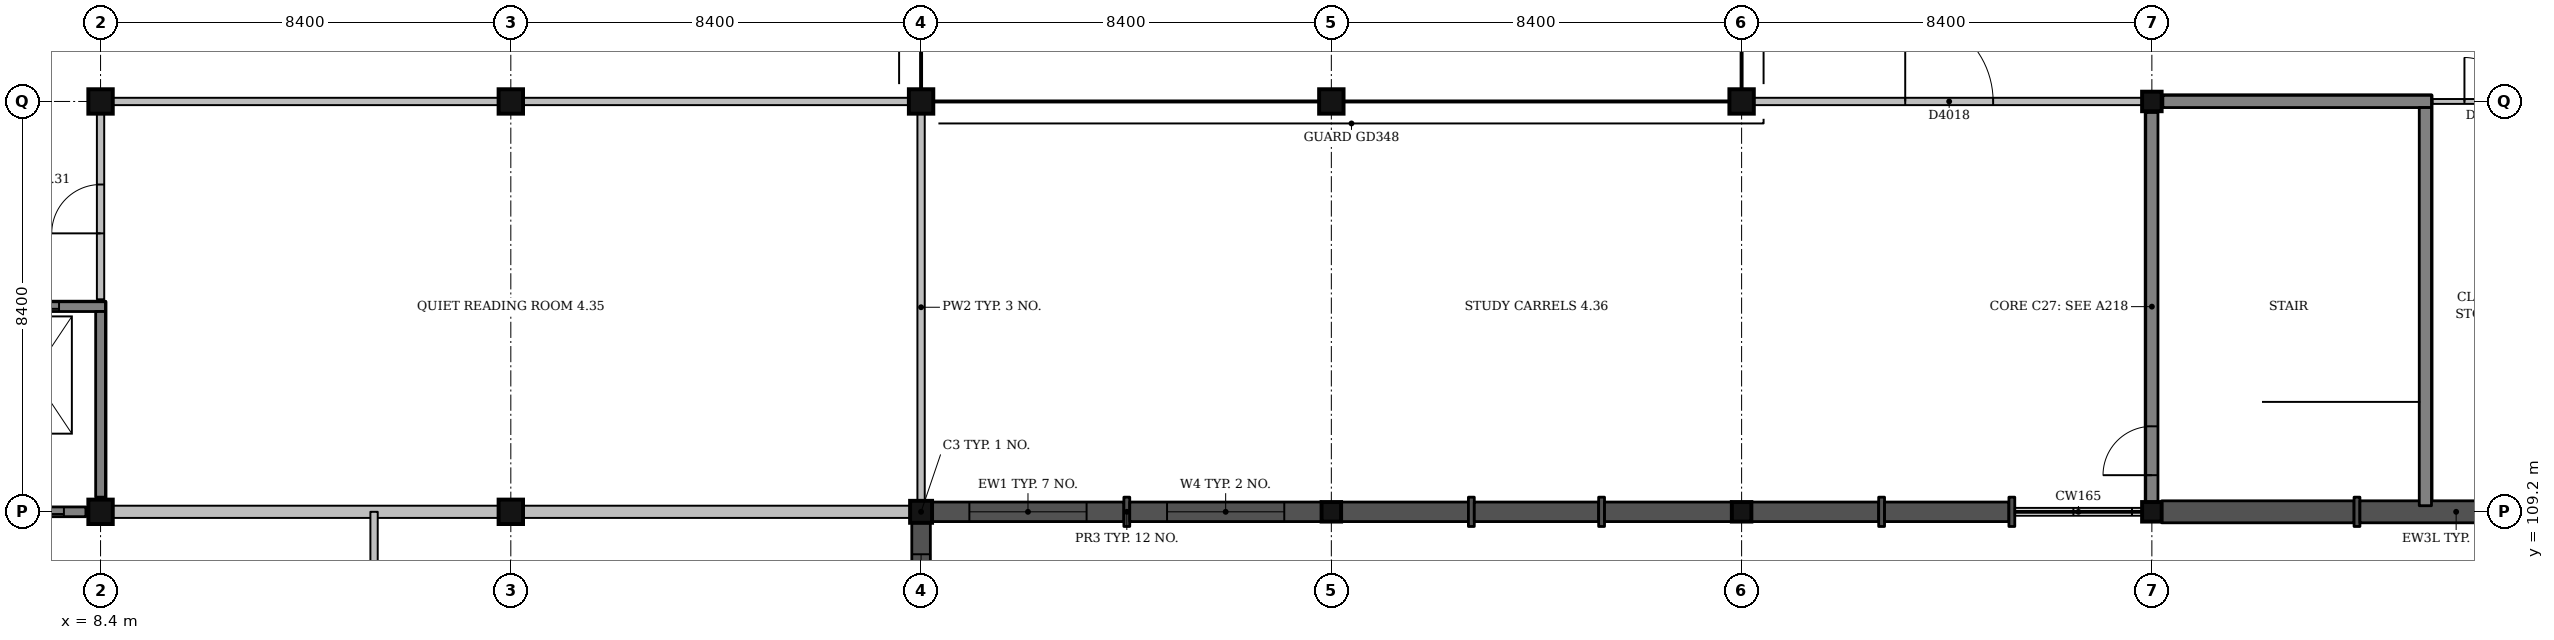
"""IFC4 building model, lengths in metres.
Left out: names, types, materials, properties, quantities, classifications, styles, units other than length and angle.
Written with IfcOpenShell. Run it as: python <this file> out.ifc"""

import sys

from ifc_helpers import new_model, si_unit, direction, frame, frame_2d, origin, origin_2d, place, context, subcontext, project, spatial, rectangle, extrude, element, fill, save


model = new_model("IFC4")
c1 = context("Model", 3, precision=1e-05, world=origin(), true_north=direction((0.0, 1.0)))
c2 = subcontext(c1, "Body", "Model", "MODEL_VIEW")
j1 = project(units=[si_unit("LENGTHUNIT", "METRE"), si_unit("PLANEANGLEUNIT", "RADIAN")], contexts=[c1])
p1 = place(None, origin())
s1 = spatial("IfcSite", under=j1, at=p1, CompositionType="ELEMENT")
p2 = place(p1, origin())
s2 = spatial("IfcBuilding", under=s1, at=p2, CompositionType="ELEMENT")
p3 = place(p2, frame((0.0, 0.0, 18.0)))
s3 = spatial("IfcBuildingStorey", under=s2, at=p3, CompositionType="ELEMENT", Elevation=18.0)
for number, where, z_axis, x_axis in (
    (1, (8.4, 109.2, 0.0), (0.0, 0.0, 1.0), (1.0, 0.0, 0.0)),
    (2, (16.8, 109.2, 0.0), (0.0, 0.0, 1.0), (1.0, 0.0, 0.0)),
):
    element("IfcColumn", number, at=place(p3, frame(where, z_axis=z_axis, x_axis=x_axis)), inside=s3, PredefinedType="COLUMN", context=c2, shape_type="SweptSolid", body=[
        extrude(rectangle(XDim=0.5, YDim=0.5, at=origin_2d()), origin(), (0.0, 0.0, 1.0), 4.5),
    ])
p4 = place(p3, frame((25.2, 109.2, 0.0), z_axis=(0.0, 0.0, 1.0), x_axis=(1.0, 0.0, 0.0)))
e3 = element("IfcColumn", 3, at=p4, inside=s3, PredefinedType="COLUMN", context=c2, shape_type="SweptSolid", body=[
    extrude(rectangle(XDim=0.45, YDim=0.45, at=origin_2d()), origin(), (0.0, 0.0, 1.0), 4.5),
])
for number, where, z_axis, x_axis in (
    (4, (8.4, 117.6, 0.0), (0.0, 0.0, 1.0), (1.0, 0.0, 0.0)),
    (5, (16.8, 117.6, 0.0), (0.0, 0.0, 1.0), (1.0, 0.0, 0.0)),
    (6, (25.2, 117.6, 0.0), (0.0, 0.0, 1.0), (1.0, 0.0, 0.0)),
):
    element("IfcColumn", number, at=place(p3, frame(where, z_axis=z_axis, x_axis=x_axis)), inside=s3, PredefinedType="COLUMN", context=c2, shape_type="SweptSolid", body=[
        extrude(rectangle(XDim=0.5, YDim=0.5, at=origin_2d()), origin(), (0.0, 0.0, 1.0), 4.5),
    ])
p5 = place(p3, frame((33.6, 109.2, 0.0), z_axis=(0.0, 0.0, 1.0), x_axis=(1.0, 0.0, 0.0)))
e7 = element("IfcColumn", 7, at=p5, inside=s3, PredefinedType="COLUMN", context=c2, shape_type="SweptSolid", body=[
    extrude(rectangle(XDim=0.4, YDim=0.4, at=origin_2d()), origin(), (0.0, 0.0, 1.0), 4.5),
])
p6 = place(p3, frame((33.6, 117.6, 0.0), z_axis=(0.0, 0.0, 1.0), x_axis=(1.0, 0.0, 0.0)))
e8 = element("IfcColumn", 8, at=p6, inside=s3, PredefinedType="COLUMN", context=c2, shape_type="SweptSolid", body=[
    extrude(rectangle(XDim=0.5, YDim=0.5, at=origin_2d()), origin(), (0.0, 0.0, 1.0), 4.5),
])
p7 = place(p3, frame((42.0, 109.2, 0.0), z_axis=(0.0, 0.0, 1.0), x_axis=(1.0, 0.0, 0.0)))
e9 = element("IfcColumn", 9, at=p7, inside=s3, PredefinedType="COLUMN", context=c2, shape_type="SweptSolid", body=[
    extrude(rectangle(XDim=0.4, YDim=0.4, at=origin_2d()), origin(), (0.0, 0.0, 1.0), 4.5),
])
p8 = place(p3, frame((42.0, 117.6, 0.0), z_axis=(0.0, 0.0, 1.0), x_axis=(1.0, 0.0, 0.0)))
e10 = element("IfcColumn", 10, at=p8, inside=s3, PredefinedType="COLUMN", context=c2, shape_type="SweptSolid", body=[
    extrude(rectangle(XDim=0.5, YDim=0.5, at=origin_2d()), origin(), (0.0, 0.0, 1.0), 4.5),
])
for number, where, z_axis, x_axis in (
    (11, (50.4, 109.2, 0.0), (0.0, 0.0, 1.0), (1.0, 0.0, 0.0)),
    (12, (50.4, 117.6, 0.0), (0.0, 0.0, 1.0), (1.0, 0.0, 0.0)),
):
    element("IfcColumn", number, at=place(p3, frame(where, z_axis=z_axis, x_axis=x_axis)), inside=s3, PredefinedType="COLUMN", context=c2, shape_type="SweptSolid", body=[
        extrude(rectangle(XDim=0.4, YDim=0.4, at=origin_2d()), origin(), (0.0, 0.0, 1.0), 4.5),
    ])
p9 = place(p3, frame((5.5, 109.2, 0.0), z_axis=(0.0, 0.0, 1.0), x_axis=(1.0, 0.0, 0.0)))
e13 = element("IfcWall", 13, at=p9, inside=s3, PredefinedType="SHEAR", context=c2, shape_type="SweptSolid", body=[
    extrude(rectangle(XDim=2.6, YDim=0.2, at=frame_2d((1.3, 0.0))), origin(), (0.0, 0.0, 1.0), 4.5),
])
p10 = place(p9, frame((1.05, 0.0, 0.0)))
e14 = element("IfcOpeningElement", 14, at=p10, cuts=e13, PredefinedType="OPENING", context=c2, shape_type="SweptSolid", body=[
    extrude(rectangle(XDim=1.1, YDim=2.1, at=frame_2d((0.55, 1.05))), frame((0.0, 0.11, 0.0), z_axis=(0.0, -1.0, 0.0), x_axis=(1.0, 0.0, 0.0)), (0.0, 0.0, 1.0), 0.22),
])
p11 = place(p3, frame((5.5, 113.4, 0.0), z_axis=(0.0, 0.0, 1.0), x_axis=(1.0, 0.0, 0.0)))
e15 = element("IfcWall", 15, at=p11, inside=s3, PredefinedType="SHEAR", context=c2, shape_type="SweptSolid", body=[
    extrude(rectangle(XDim=3.0, YDim=0.2, at=frame_2d((1.5, 0.0))), origin(), (0.0, 0.0, 1.0), 4.5),
])
p12 = place(p11, frame((0.95, 0.0, 0.0)))
e16 = element("IfcOpeningElement", 16, at=p12, cuts=e15, PredefinedType="OPENING", context=c2, shape_type="SweptSolid", body=[
    extrude(rectangle(XDim=1.1, YDim=2.1, at=frame_2d((0.55, 1.05))), frame((0.0, 0.11, 0.0), z_axis=(0.0, -1.0, 0.0), x_axis=(1.0, 0.0, 0.0)), (0.0, 0.0, 1.0), 0.22),
])
p13 = place(p3, frame((8.4, 109.5, 0.0), z_axis=(0.0, 0.0, 1.0), x_axis=(0.0, 1.0, 0.0)))
e17 = element("IfcWall", 17, at=p13, inside=s3, PredefinedType="SHEAR", context=c2, shape_type="SweptSolid", body=[
    extrude(rectangle(XDim=3.8, YDim=0.2, at=frame_2d((1.9, 0.0))), origin(), (0.0, 0.0, 1.0), 4.5),
])
p14 = place(p3, frame((50.625, 117.6, 0.0), z_axis=(0.0, 0.0, 1.0), x_axis=(1.0, 0.0, 0.0)))
e18 = element("IfcWall", 18, at=p14, inside=s3, PredefinedType="SHEAR", context=c2, shape_type="SweptSolid", body=[
    extrude(rectangle(XDim=5.5, YDim=0.25, at=frame_2d((2.75, 0.0))), origin(), (0.0, 0.0, 1.0), 4.2),
])
p15 = place(p3, frame((50.4, 109.4, 0.0), z_axis=(0.0, 0.0, 1.0), x_axis=(0.0, 1.0, 0.0)))
e19 = element("IfcWall", 19, at=p15, inside=s3, PredefinedType="SHEAR", context=c2, shape_type="SweptSolid", body=[
    extrude(rectangle(XDim=7.975, YDim=0.25, at=frame_2d((3.988, 0.0))), origin(), (0.0, 0.0, 1.0), 4.2),
])
p16 = place(p15, frame((0.55, 0.0, 0.0)))
e20 = element("IfcOpeningElement", 20, at=p16, cuts=e19, PredefinedType="OPENING", context=c2, shape_type="SweptSolid", body=[
    extrude(rectangle(XDim=1.0, YDim=2.1, at=frame_2d((0.5, 1.05))), frame((0.0, 0.135, 0.0), z_axis=(0.0, -1.0, 0.0), x_axis=(1.0, 0.0, 0.0)), (0.0, 0.0, 1.0), 0.27),
])
p17 = place(p3, frame((56.0, 109.325, 0.0), z_axis=(0.0, 0.0, 1.0), x_axis=(0.0, 1.0, 0.0)))
e21 = element("IfcWall", 21, at=p17, inside=s3, PredefinedType="SHEAR", context=c2, shape_type="SweptSolid", body=[
    extrude(rectangle(XDim=8.15, YDim=0.25, at=frame_2d((4.075, 0.0))), origin(), (0.0, 0.0, 1.0), 4.2),
])
p18 = place(p3, frame((25.2, 105.288, 0.0), z_axis=(0.0, 0.0, 1.0), x_axis=(0.0, 1.0, 0.0)))
e22 = element("IfcWall", 22, at=p18, inside=s3, PredefinedType="SOLIDWALL", context=c2, shape_type="SweptSolid", body=[
    extrude(rectangle(XDim=3.688, YDim=0.38, at=frame_2d((1.844, 0.0))), origin(), (0.0, 0.0, 1.0), 3.35),
])
p19 = place(p18, frame((0.644, 0.0, 1.2)))
e23 = element("IfcOpeningElement", 23, at=p19, cuts=e22, PredefinedType="OPENING", context=c2, shape_type="SweptSolid", body=[
    extrude(rectangle(XDim=2.4, YDim=1.5, at=frame_2d((1.2, 0.75))), frame((0.0, 0.2, 0.0), z_axis=(0.0, -1.0, 0.0), x_axis=(1.0, 0.0, 0.0)), (0.0, 0.0, 1.0), 0.4),
])
p20 = place(p3, frame((25.425, 109.2, 0.0), z_axis=(0.0, 0.0, 1.0), x_axis=(1.0, 0.0, 0.0)))
e24 = element("IfcWall", 24, at=p20, inside=s3, PredefinedType="SOLIDWALL", context=c2, shape_type="SweptSolid", body=[
    extrude(rectangle(XDim=3.927, YDim=0.4, at=frame_2d((1.964, 0.0))), origin(), (0.0, 0.0, 1.0), 4.2),
])
p21 = place(p20, frame((0.764, 0.0, 0.6)))
e25 = element("IfcOpeningElement", 25, at=p21, cuts=e24, PredefinedType="OPENING", context=c2, shape_type="SweptSolid", body=[
    extrude(rectangle(XDim=2.4, YDim=2.4, at=frame_2d((1.2, 1.2))), frame((0.0, 0.21, 0.0), z_axis=(0.0, -1.0, 0.0), x_axis=(1.0, 0.0, 0.0)), (0.0, 0.0, 1.0), 0.42),
])
p22 = place(p3, frame((29.353, 109.2, 0.0), z_axis=(0.0, 0.0, 1.0), x_axis=(1.0, 0.0, 0.0)))
e26 = element("IfcWall", 26, at=p22, inside=s3, PredefinedType="SOLIDWALL", context=c2, shape_type="SweptSolid", body=[
    extrude(rectangle(XDim=0.12, YDim=0.6, at=frame_2d((0.06, 0.0))), origin(), (0.0, 0.0, 1.0), 4.2),
])
p23 = place(p3, frame((29.472, 109.2, 0.0), z_axis=(0.0, 0.0, 1.0), x_axis=(1.0, 0.0, 0.0)))
e27 = element("IfcWall", 27, at=p23, inside=s3, PredefinedType="SOLIDWALL", context=c2, shape_type="SweptSolid", body=[
    extrude(rectangle(XDim=3.927, YDim=0.4, at=frame_2d((1.964, 0.0))), origin(), (0.0, 0.0, 1.0), 4.2),
])
p24 = place(p23, frame((0.764, 0.0, 0.6)))
e28 = element("IfcOpeningElement", 28, at=p24, cuts=e27, PredefinedType="OPENING", context=c2, shape_type="SweptSolid", body=[
    extrude(rectangle(XDim=2.4, YDim=2.4, at=frame_2d((1.2, 1.2))), frame((0.0, 0.21, 0.0), z_axis=(0.0, -1.0, 0.0), x_axis=(1.0, 0.0, 0.0)), (0.0, 0.0, 1.0), 0.42),
])
p25 = place(p3, frame((33.8, 109.2, 0.0), z_axis=(0.0, 0.0, 1.0), x_axis=(1.0, 0.0, 0.0)))
e29 = element("IfcWall", 29, at=p25, inside=s3, PredefinedType="SOLIDWALL", context=c2, shape_type="SweptSolid", body=[
    extrude(rectangle(XDim=2.607, YDim=0.4, at=frame_2d((1.303, 0.0))), origin(), (0.0, 0.0, 1.0), 3.35),
])
p26 = place(p3, frame((36.407, 109.2, 0.0), z_axis=(0.0, 0.0, 1.0), x_axis=(1.0, 0.0, 0.0)))
e30 = element("IfcWall", 30, at=p26, inside=s3, PredefinedType="SOLIDWALL", context=c2, shape_type="SweptSolid", body=[
    extrude(rectangle(XDim=0.12, YDim=0.6, at=frame_2d((0.06, 0.0))), origin(), (0.0, 0.0, 1.0), 3.35),
])
p27 = place(p3, frame((36.527, 109.2, 0.0), z_axis=(0.0, 0.0, 1.0), x_axis=(1.0, 0.0, 0.0)))
e31 = element("IfcWall", 31, at=p27, inside=s3, PredefinedType="SOLIDWALL", context=c2, shape_type="SweptSolid", body=[
    extrude(rectangle(XDim=2.547, YDim=0.4, at=frame_2d((1.273, 0.0))), origin(), (0.0, 0.0, 1.0), 3.35),
])
p28 = place(p3, frame((39.073, 109.2, 0.0), z_axis=(0.0, 0.0, 1.0), x_axis=(1.0, 0.0, 0.0)))
e32 = element("IfcWall", 32, at=p28, inside=s3, PredefinedType="SOLIDWALL", context=c2, shape_type="SweptSolid", body=[
    extrude(rectangle(XDim=0.12, YDim=0.6, at=frame_2d((0.06, 0.0))), origin(), (0.0, 0.0, 1.0), 3.35),
])
for number, where, z_axis, x_axis in (
    (33, (39.193, 109.2, 0.0), (0.0, 0.0, 1.0), (1.0, 0.0, 0.0)),
    (34, (42.2, 109.2, 0.0), (0.0, 0.0, 1.0), (1.0, 0.0, 0.0)),
):
    element("IfcWall", number, at=place(p3, frame(where, z_axis=z_axis, x_axis=x_axis)), inside=s3, PredefinedType="SOLIDWALL", context=c2, shape_type="SweptSolid", body=[
        extrude(rectangle(XDim=2.607, YDim=0.4, at=frame_2d((1.303, 0.0))), origin(), (0.0, 0.0, 1.0), 3.35),
    ])
p29 = place(p3, frame((44.807, 109.2, 0.0), z_axis=(0.0, 0.0, 1.0), x_axis=(1.0, 0.0, 0.0)))
e35 = element("IfcWall", 35, at=p29, inside=s3, PredefinedType="SOLIDWALL", context=c2, shape_type="SweptSolid", body=[
    extrude(rectangle(XDim=0.12, YDim=0.6, at=frame_2d((0.06, 0.0))), origin(), (0.0, 0.0, 1.0), 3.35),
])
p30 = place(p3, frame((44.927, 109.2, 0.0), z_axis=(0.0, 0.0, 1.0), x_axis=(1.0, 0.0, 0.0)))
e36 = element("IfcWall", 36, at=p30, inside=s3, PredefinedType="SOLIDWALL", context=c2, shape_type="SweptSolid", body=[
    extrude(rectangle(XDim=2.547, YDim=0.4, at=frame_2d((1.273, 0.0))), origin(), (0.0, 0.0, 1.0), 3.35),
])
p31 = place(p3, frame((47.473, 109.2, 0.0), z_axis=(0.0, 0.0, 1.0), x_axis=(1.0, 0.0, 0.0)))
e37 = element("IfcWall", 37, at=p31, inside=s3, PredefinedType="SOLIDWALL", context=c2, shape_type="SweptSolid", body=[
    extrude(rectangle(XDim=0.12, YDim=0.6, at=frame_2d((0.06, 0.0))), origin(), (0.0, 0.0, 1.0), 3.35),
])
p32 = place(p3, frame((50.6, 109.2, 0.0), z_axis=(0.0, 0.0, 1.0), x_axis=(1.0, 0.0, 0.0)))
e38 = element("IfcWall", 38, at=p32, inside=s3, PredefinedType="SOLIDWALL", context=c2, shape_type="SweptSolid", body=[
    extrude(rectangle(XDim=3.94, YDim=0.45, at=frame_2d((1.97, 0.0))), origin(), (0.0, 0.0, 1.0), 3.6),
])
p33 = place(p3, frame((54.54, 109.2, 0.0), z_axis=(0.0, 0.0, 1.0), x_axis=(1.0, 0.0, 0.0)))
e39 = element("IfcWall", 39, at=p33, inside=s3, PredefinedType="SOLIDWALL", context=c2, shape_type="SweptSolid", body=[
    extrude(rectangle(XDim=0.12, YDim=0.6, at=frame_2d((0.06, 0.0))), origin(), (0.0, 0.0, 1.0), 3.6),
])
p34 = place(p3, frame((54.66, 109.2, 0.0), z_axis=(0.0, 0.0, 1.0), x_axis=(1.0, 0.0, 0.0)))
e40 = element("IfcWall", 40, at=p34, inside=s3, PredefinedType="SOLIDWALL", context=c2, shape_type="SweptSolid", body=[
    extrude(rectangle(XDim=3.94, YDim=0.45, at=frame_2d((1.97, 0.0))), origin(), (0.0, 0.0, 1.0), 3.6),
])
p35 = place(p3, frame((8.65, 109.2, 0.0), z_axis=(0.0, 0.0, 1.0), x_axis=(1.0, 0.0, 0.0)))
e41 = element("IfcWall", 41, at=p35, inside=s3, PredefinedType="SOLIDWALL", context=c2, shape_type="SweptSolid", body=[
    extrude(rectangle(XDim=7.9, YDim=0.25, at=frame_2d((3.95, 0.0))), origin(), (0.0, 0.0, 1.0), 4.15),
])
p36 = place(p3, frame((17.05, 109.2, 0.0), z_axis=(0.0, 0.0, 1.0), x_axis=(1.0, 0.0, 0.0)))
e42 = element("IfcWall", 42, at=p36, inside=s3, PredefinedType="SOLIDWALL", context=c2, shape_type="SweptSolid", body=[
    extrude(rectangle(XDim=7.925, YDim=0.25, at=frame_2d((3.962, 0.0))), origin(), (0.0, 0.0, 1.0), 3.35),
])
p37 = place(p3, frame((8.65, 117.6, 0.0), z_axis=(0.0, 0.0, 1.0), x_axis=(1.0, 0.0, 0.0)))
e43 = element("IfcWall", 43, at=p37, inside=s3, PredefinedType="PARTITIONING", context=c2, shape_type="SweptSolid", body=[
    extrude(rectangle(XDim=7.9, YDim=0.15, at=frame_2d((3.95, 0.0))), origin(), (0.0, 0.0, 1.0), 3.4),
])
p38 = place(p3, frame((17.05, 117.6, 0.0), z_axis=(0.0, 0.0, 1.0), x_axis=(1.0, 0.0, 0.0)))
e44 = element("IfcWall", 44, at=p38, inside=s3, PredefinedType="PARTITIONING", context=c2, shape_type="SweptSolid", body=[
    extrude(rectangle(XDim=7.9, YDim=0.15, at=frame_2d((3.95, 0.0))), origin(), (0.0, 0.0, 1.0), 3.4),
])
p39 = place(p3, frame((42.25, 117.6, 0.0), z_axis=(0.0, 0.0, 1.0), x_axis=(1.0, 0.0, 0.0)))
e45 = element("IfcWall", 45, at=p39, inside=s3, PredefinedType="PARTITIONING", context=c2, shape_type="SweptSolid", body=[
    extrude(rectangle(XDim=7.95, YDim=0.15, at=frame_2d((3.975, 0.0))), origin(), (0.0, 0.0, 1.0), 3.35),
])
p40 = place(p39, frame((3.1, 0.0, 0.0)))
e46 = element("IfcOpeningElement", 46, at=p40, cuts=e45, PredefinedType="OPENING", context=c2, shape_type="SweptSolid", body=[
    extrude(rectangle(XDim=1.8, YDim=2.1, at=frame_2d((0.9, 1.05))), frame((0.0, 0.085, 0.0), z_axis=(0.0, -1.0, 0.0), x_axis=(1.0, 0.0, 0.0)), (0.0, 0.0, 1.0), 0.17),
])
p41 = place(p3, frame((56.15, 117.6, 0.0), z_axis=(0.0, 0.0, 1.0), x_axis=(1.0, 0.0, 0.0)))
e47 = element("IfcWall", 47, at=p41, inside=s3, PredefinedType="PARTITIONING", context=c2, shape_type="SweptSolid", body=[
    extrude(rectangle(XDim=2.45, YDim=0.1, at=frame_2d((1.225, 0.0))), origin(), (0.0, 0.0, 1.0), 3.6),
])
p42 = place(p41, frame((0.65, 0.0, 0.0)))
e48 = element("IfcOpeningElement", 48, at=p42, cuts=e47, PredefinedType="OPENING", context=c2, shape_type="SweptSolid", body=[
    extrude(rectangle(XDim=0.9, YDim=2.1, at=frame_2d((0.45, 1.05))), frame((0.0, 0.06, 0.0), z_axis=(0.0, -1.0, 0.0), x_axis=(1.0, 0.0, 0.0)), (0.0, 0.0, 1.0), 0.12),
])
p43 = place(p3, frame((8.4, 113.55, 0.0), z_axis=(0.0, 0.0, 1.0), x_axis=(0.0, 1.0, 0.0)))
e49 = element("IfcWall", 49, at=p43, inside=s3, PredefinedType="PARTITIONING", context=c2, shape_type="SweptSolid", body=[
    extrude(rectangle(XDim=3.8, YDim=0.15, at=frame_2d((1.9, 0.0))), origin(), (0.0, 0.0, 1.0), 3.4),
])
p44 = place(p43, frame((1.35, 0.0, 0.0)))
e50 = element("IfcOpeningElement", 50, at=p44, cuts=e49, PredefinedType="OPENING", context=c2, shape_type="SweptSolid", body=[
    extrude(rectangle(XDim=1.0, YDim=2.1, at=frame_2d((0.5, 1.05))), frame((0.0, 0.085, 0.0), z_axis=(0.0, -1.0, 0.0), x_axis=(1.0, 0.0, 0.0)), (0.0, 0.0, 1.0), 0.17),
])
p45 = place(p3, frame((14.0, 100.8, 0.0), z_axis=(0.0, 0.0, 1.0), x_axis=(0.0, 1.0, 0.0)))
e51 = element("IfcWall", 51, at=p45, inside=s3, PredefinedType="PARTITIONING", context=c2, shape_type="SweptSolid", body=[
    extrude(rectangle(XDim=8.4, YDim=0.15, at=frame_2d((4.2, 0.0))), origin(), (0.0, 0.0, 1.0), 3.4),
])
p46 = place(p45, frame((3.8, 0.0, 0.0)))
e52 = element("IfcOpeningElement", 52, at=p46, cuts=e51, PredefinedType="OPENING", context=c2, shape_type="SweptSolid", body=[
    extrude(rectangle(XDim=1.0, YDim=2.1, at=frame_2d((0.5, 1.05))), frame((0.0, 0.085, 0.0), z_axis=(0.0, -1.0, 0.0), x_axis=(1.0, 0.0, 0.0)), (0.0, 0.0, 1.0), 0.17),
])
p47 = place(p3, frame((25.2, 109.425, 0.0), z_axis=(0.0, 0.0, 1.0), x_axis=(0.0, 1.0, 0.0)))
e53 = element("IfcWall", 53, at=p47, inside=s3, PredefinedType="PARTITIONING", context=c2, shape_type="SweptSolid", body=[
    extrude(rectangle(XDim=7.925, YDim=0.15, at=frame_2d((3.962, 0.0))), origin(), (0.0, 0.0, 1.0), 4.15),
])
p48 = place(p19, origin())
e54 = element("IfcWindow", 54, at=p48, inside=s3, PartitioningType="SINGLE_PANEL", PredefinedType="WINDOW", context=c2, shape_type="SweptSolid", body=[
    extrude(rectangle(XDim=2.4, YDim=1.5, at=frame_2d((1.2, 0.75))), frame((0.0, 0.15, 0.0), z_axis=(0.0, -1.0, 0.0), x_axis=(1.0, 0.0, 0.0)), (0.0, 0.0, 1.0), 0.06),
])
fill(e23, e54)
p49 = place(p21, origin())
e55 = element("IfcWindow", 55, at=p49, inside=s3, PartitioningType="SINGLE_PANEL", PredefinedType="WINDOW", context=c2, shape_type="SweptSolid", body=[
    extrude(rectangle(XDim=2.4, YDim=2.4, at=frame_2d((1.2, 1.2))), frame((0.0, 0.16, 0.0), z_axis=(0.0, -1.0, 0.0), x_axis=(1.0, 0.0, 0.0)), (0.0, 0.0, 1.0), 0.06),
])
fill(e25, e55)
p50 = place(p24, origin())
e56 = element("IfcWindow", 56, at=p50, inside=s3, PartitioningType="SINGLE_PANEL", PredefinedType="WINDOW", context=c2, shape_type="SweptSolid", body=[
    extrude(rectangle(XDim=2.4, YDim=2.4, at=frame_2d((1.2, 1.2))), frame((0.0, 0.16, 0.0), z_axis=(0.0, -1.0, 0.0), x_axis=(1.0, 0.0, 0.0)), (0.0, 0.0, 1.0), 0.06),
])
fill(e28, e56)
p51 = place(p42, origin())
e57 = element("IfcDoor", 57, at=p51, inside=s3, OperationType="SINGLE_SWING_LEFT", PredefinedType="DOOR", context=c2, shape_type="SweptSolid", body=[
    extrude(rectangle(XDim=0.9, YDim=2.1, at=frame_2d((0.45, 1.05))), frame((0.0, 0.025, 0.0), z_axis=(0.0, -1.0, 0.0), x_axis=(1.0, 0.0, 0.0)), (0.0, 0.0, 1.0), 0.05),
])
fill(e48, e57)
p52 = place(p44, origin())
e58 = element("IfcDoor", 58, at=p52, inside=s3, OperationType="SINGLE_SWING_LEFT", PredefinedType="DOOR", context=c2, shape_type="SweptSolid", body=[
    extrude(rectangle(XDim=1.0, YDim=2.1, at=frame_2d((0.5, 1.05))), frame((0.0, 0.025, 0.0), z_axis=(0.0, -1.0, 0.0), x_axis=(1.0, 0.0, 0.0)), (0.0, 0.0, 1.0), 0.05),
])
fill(e50, e58)
p53 = place(p40, origin())
e59 = element("IfcDoor", 59, at=p53, inside=s3, OperationType="DOUBLE_DOOR_SINGLE_SWING", PredefinedType="DOOR", context=c2, shape_type="SweptSolid", body=[
    extrude(rectangle(XDim=1.8, YDim=2.1, at=frame_2d((0.9, 1.05))), frame((0.0, 0.025, 0.0), z_axis=(0.0, -1.0, 0.0), x_axis=(1.0, 0.0, 0.0)), (0.0, 0.0, 1.0), 0.05),
])
fill(e46, e59)
p54 = place(p16, origin())
e60 = element("IfcDoor", 60, at=p54, inside=s3, OperationType="SINGLE_SWING_LEFT", PredefinedType="DOOR", context=c2, shape_type="SweptSolid", body=[
    extrude(rectangle(XDim=1.0, YDim=2.1, at=frame_2d((0.5, 1.05))), frame((0.0, 0.025, 0.0), z_axis=(0.0, -1.0, 0.0), x_axis=(1.0, 0.0, 0.0)), (0.0, 0.0, 1.0), 0.05),
])
fill(e20, e60)
p55 = place(p10, origin())
e61 = element("IfcDoor", 61, at=p55, inside=s3, OperationType="SLIDING_TO_RIGHT", PredefinedType="DOOR", context=c2, shape_type="SweptSolid", body=[
    extrude(rectangle(XDim=1.1, YDim=2.1, at=frame_2d((0.55, 1.05))), frame((0.0, 0.025, 0.0), z_axis=(0.0, -1.0, 0.0), x_axis=(1.0, 0.0, 0.0)), (0.0, 0.0, 1.0), 0.05),
])
fill(e14, e61)
p56 = place(p12, origin())
e62 = element("IfcDoor", 62, at=p56, inside=s3, OperationType="SLIDING_TO_LEFT", PredefinedType="DOOR", context=c2, shape_type="SweptSolid", body=[
    extrude(rectangle(XDim=1.1, YDim=2.1, at=frame_2d((0.55, 1.05))), frame((0.0, 0.025, 0.0), z_axis=(0.0, -1.0, 0.0), x_axis=(1.0, 0.0, 0.0)), (0.0, 0.0, 1.0), 0.05),
])
fill(e16, e62)
save(model, sys.argv[1])
